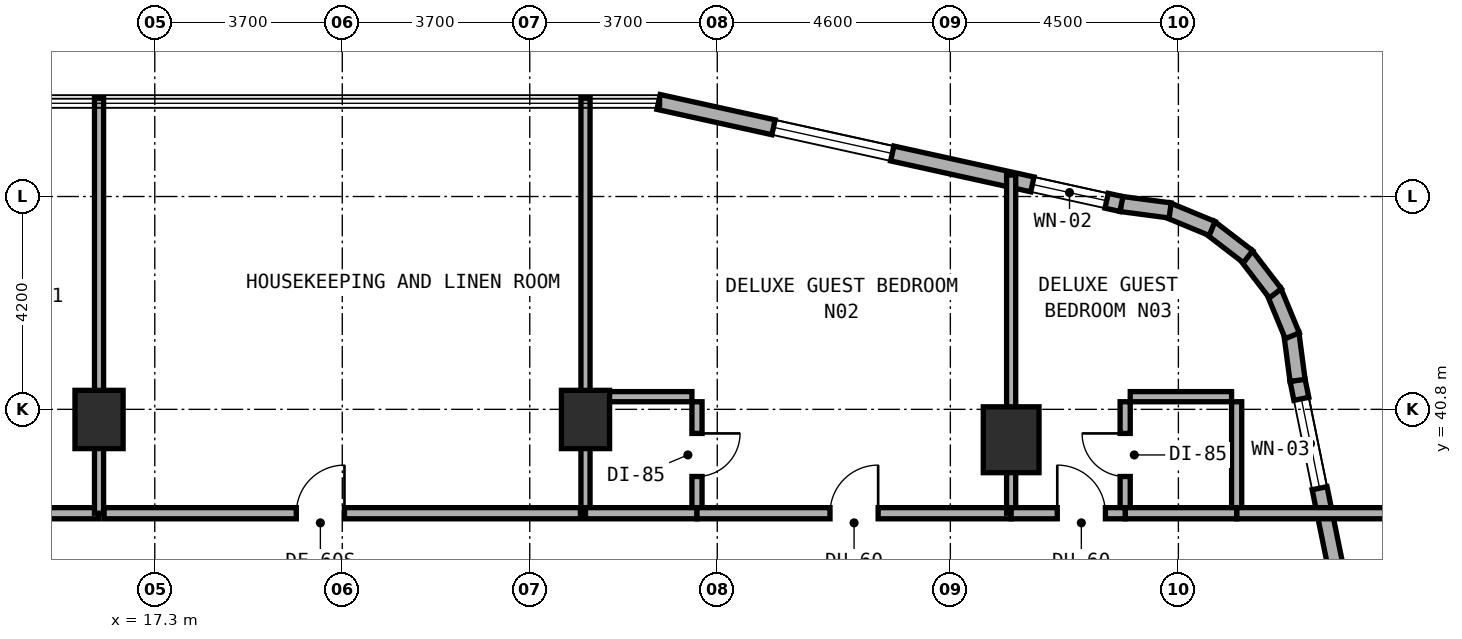
"""IFC4 building model, lengths in metres.
Left out: names, types, materials, properties, quantities, classifications, styles, units other than length and angle.
Written with IfcOpenShell. Run it as: python <this file> out.ifc"""

import sys

from ifc_helpers import new_model, si_unit, direction, frame, frame_2d, origin, origin_2d, place, context, subcontext, project, spatial, rectangle, extrude, element, fill, save


model = new_model("IFC4")
c1 = context("Model", 3, precision=1e-05, world=origin(), true_north=direction((0.0, 1.0)))
c2 = subcontext(c1, "Body", "Model", "MODEL_VIEW")
j1 = project(units=[si_unit("LENGTHUNIT", "METRE"), si_unit("PLANEANGLEUNIT", "RADIAN")], contexts=[c1])
p1 = place(None, origin())
s1 = spatial("IfcSite", under=j1, at=p1, CompositionType="ELEMENT")
p2 = place(p1, origin())
s2 = spatial("IfcBuilding", under=s1, at=p2, CompositionType="ELEMENT")
p3 = place(p2, frame((0.0, 0.0, 31.0)))
s3 = spatial("IfcBuildingStorey", under=s2, at=p3, CompositionType="ELEMENT", Elevation=31.0)
for number, where, z_axis, x_axis in (
    (1, (16.2, 40.6, 0.0), (0.0, 0.0, 1.0), (1.0, 0.0, 0.0)),
    (2, (25.8, 40.6, 0.0), (0.0, 0.0, 1.0), (1.0, 0.0, 0.0)),
):
    element("IfcColumn", number, at=place(p3, frame(where, z_axis=z_axis, x_axis=x_axis)), inside=s3, PredefinedType="COLUMN", context=c2, shape_type="SweptSolid", body=[
        extrude(rectangle(XDim=0.95, YDim=1.15, at=origin_2d()), origin(), (0.0, 0.0, 1.0), 3.5),
    ])
p4 = place(p3, frame((34.2, 40.2, 0.0), z_axis=(0.0, 0.0, 1.0), x_axis=(1.0, 0.0, 0.0)))
e3 = element("IfcColumn", 3, at=p4, inside=s3, PredefinedType="COLUMN", context=c2, shape_type="SweptSolid", body=[
    extrude(rectangle(XDim=1.1, YDim=1.3, at=origin_2d()), origin(), (0.0, 0.0, 1.0), 3.5),
])
p5 = place(p3, frame((41.864, 31.516, 0.0), z_axis=(0.0, 0.0, 1.0), x_axis=(-0.199990901713, 0.979797754249, 0.0)))
e4 = element("IfcWall", 4, at=p5, inside=s3, PredefinedType="STANDARD", context=c2, shape_type="SweptSolid", body=[
    extrude(rectangle(XDim=10.065, YDim=0.3, at=frame_2d((5.033, 0.0))), origin(), (0.0, 0.0, 1.0), 3.22),
])
p6 = place(p5, frame((2.429, 0.0, 0.8)))
e5 = element("IfcOpeningElement", 5, at=p6, cuts=e4, PredefinedType="OPENING", context=c2, shape_type="SweptSolid", body=[
    extrude(rectangle(XDim=2.4, YDim=1.6, at=frame_2d((1.2, 0.8))), frame((0.0, 0.16, 0.0), z_axis=(0.0, -1.0, 0.0), x_axis=(1.0, 0.0, 0.0)), (0.0, 0.0, 1.0), 0.32),
])
p7 = place(p5, frame((7.887, 0.0, 0.85)))
e6 = element("IfcOpeningElement", 6, at=p7, cuts=e4, PredefinedType="OPENING", context=c2, shape_type="SweptSolid", body=[
    extrude(rectangle(XDim=1.8, YDim=1.5, at=frame_2d((0.9, 0.75))), frame((0.0, 0.16, 0.0), z_axis=(0.0, -1.0, 0.0), x_axis=(1.0, 0.0, 0.0)), (0.0, 0.0, 1.0), 0.32),
])
p8 = place(p3, frame((39.852, 41.372, 0.0), z_axis=(0.0, 0.0, 1.0), x_axis=(-0.131174864804, 0.991359246108, 0.0)))
e7 = element("IfcWall", 7, at=p8, inside=s3, PredefinedType="STANDARD", context=c2, shape_type="SweptSolid", body=[
    extrude(rectangle(XDim=0.938, YDim=0.3, at=frame_2d((0.469, 0.0))), origin(), (0.0, 0.0, 1.0), 3.22),
])
p9 = place(p3, frame((39.748, 42.252, 0.0), z_axis=(0.0, 0.0, 1.0), x_axis=(-0.382344263057, 0.924019948111, 0.0)))
e8 = element("IfcWall", 8, at=p9, inside=s3, PredefinedType="STANDARD", context=c2, shape_type="SweptSolid", body=[
    extrude(rectangle(XDim=0.955, YDim=0.3, at=frame_2d((0.477, 0.0))), origin(), (0.0, 0.0, 1.0), 3.22),
])
p10 = place(p3, frame((39.414, 43.089, 0.0), z_axis=(0.0, 0.0, 1.0), x_axis=(-0.608474481025, 0.793573440799, 0.0)))
e9 = element("IfcWall", 9, at=p10, inside=s3, PredefinedType="STANDARD", context=c2, shape_type="SweptSolid", body=[
    extrude(rectangle(XDim=0.955, YDim=0.3, at=frame_2d((0.478, 0.0))), origin(), (0.0, 0.0, 1.0), 3.22),
])
p11 = place(p3, frame((38.875, 43.812, 0.0), z_axis=(0.0, 0.0, 1.0), x_axis=(-0.793668068435, 0.608351047625, 0.0)))
e10 = element("IfcWall", 10, at=p11, inside=s3, PredefinedType="STANDARD", context=c2, shape_type="SweptSolid", body=[
    extrude(rectangle(XDim=0.955, YDim=0.3, at=frame_2d((0.478, 0.0))), origin(), (0.0, 0.0, 1.0), 3.22),
])
p12 = place(p3, frame((38.166, 44.369, 0.0), z_axis=(0.0, 0.0, 1.0), x_axis=(-0.924019948111, 0.382344263057, 0.0)))
e11 = element("IfcWall", 11, at=p12, inside=s3, PredefinedType="STANDARD", context=c2, shape_type="SweptSolid", body=[
    extrude(rectangle(XDim=0.955, YDim=0.3, at=frame_2d((0.477, 0.0))), origin(), (0.0, 0.0, 1.0), 3.22),
])
p13 = place(p3, frame((37.337, 44.725, 0.0), z_axis=(0.0, 0.0, 1.0), x_axis=(-0.991454295543, 0.130454512571, 0.0)))
e12 = element("IfcWall", 12, at=p13, inside=s3, PredefinedType="STANDARD", context=c2, shape_type="SweptSolid", body=[
    extrude(rectangle(XDim=0.973, YDim=0.3, at=frame_2d((0.487, 0.0))), origin(), (0.0, 0.0, 1.0), 3.22),
])
p14 = place(p3, frame((36.376, 44.852, 0.0), z_axis=(0.0, 0.0, 1.0), x_axis=(-0.97654500432, 0.215313386808, 0.0)))
e13 = element("IfcWall", 13, at=p14, inside=s3, PredefinedType="STANDARD", context=c2, shape_type="SweptSolid", body=[
    extrude(rectangle(XDim=9.354, YDim=0.3, at=frame_2d((4.677, 0.0))), origin(), (0.0, 0.0, 1.0), 3.22),
])
p15 = place(p14, frame((0.299, 0.0, 0.85)))
e14 = element("IfcOpeningElement", 14, at=p15, cuts=e13, PredefinedType="OPENING", context=c2, shape_type="SweptSolid", body=[
    extrude(rectangle(XDim=1.5, YDim=1.5, at=frame_2d((0.75, 0.75))), frame((0.0, 0.16, 0.0), z_axis=(0.0, -1.0, 0.0), x_axis=(1.0, 0.0, 0.0)), (0.0, 0.0, 1.0), 0.32),
])
p16 = place(p14, frame((4.631, 0.0, 0.8)))
e15 = element("IfcOpeningElement", 15, at=p16, cuts=e13, PredefinedType="OPENING", context=c2, shape_type="SweptSolid", body=[
    extrude(rectangle(XDim=2.4, YDim=1.6, at=frame_2d((1.2, 0.8))), frame((0.0, 0.16, 0.0), z_axis=(0.0, -1.0, 0.0), x_axis=(1.0, 0.0, 0.0)), (0.0, 0.0, 1.0), 0.32),
])
p17 = place(p3, frame((5.55, 38.75, 0.0), z_axis=(0.0, 0.0, 1.0), x_axis=(1.0, 0.0, 0.0)))
e16 = element("IfcWall", 16, at=p17, inside=s3, PredefinedType="SOLIDWALL", context=c2, shape_type="SweptSolid", body=[
    extrude(rectangle(XDim=10.65, YDim=0.22, at=frame_2d((5.325, 0.0))), origin(), (0.0, 0.0, 1.0), 2.395),
])
p18 = place(p17, frame((4.85, 0.0, 0.0)))
e17 = element("IfcOpeningElement", 17, at=p18, cuts=e16, PredefinedType="OPENING", context=c2, shape_type="SweptSolid", body=[
    extrude(rectangle(XDim=0.95, YDim=2.1, at=frame_2d((0.475, 1.05))), frame((0.0, 0.12, 0.0), z_axis=(0.0, -1.0, 0.0), x_axis=(1.0, 0.0, 0.0)), (0.0, 0.0, 1.0), 0.24),
])
p19 = place(p3, frame((16.2, 38.75, 0.0), z_axis=(0.0, 0.0, 1.0), x_axis=(0.0, 1.0, 0.0)))
e18 = element("IfcWall", 18, at=p19, inside=s3, PredefinedType="SOLIDWALL", context=c2, shape_type="SweptSolid", body=[
    extrude(rectangle(XDim=8.19, YDim=0.18, at=frame_2d((4.095, 0.0))), origin(), (0.0, 0.0, 1.0), 2.395),
])
p20 = place(p3, frame((16.3, 38.75, 0.0), z_axis=(0.0, 0.0, 1.0), x_axis=(1.0, 0.0, 0.0)))
e19 = element("IfcWall", 19, at=p20, inside=s3, PredefinedType="SOLIDWALL", context=c2, shape_type="SweptSolid", body=[
    extrude(rectangle(XDim=9.4, YDim=0.22, at=frame_2d((4.7, 0.0))), origin(), (0.0, 0.0, 1.0), 2.795),
])
p21 = place(p20, frame((3.793, 0.0, 0.0)))
e20 = element("IfcOpeningElement", 20, at=p21, cuts=e19, PredefinedType="OPENING", context=c2, shape_type="SweptSolid", body=[
    extrude(rectangle(XDim=0.95, YDim=2.1, at=frame_2d((0.475, 1.05))), frame((0.0, 0.12, 0.0), z_axis=(0.0, -1.0, 0.0), x_axis=(1.0, 0.0, 0.0)), (0.0, 0.0, 1.0), 0.24),
])
p22 = place(p3, frame((25.8, 38.75, 0.0), z_axis=(0.0, 0.0, 1.0), x_axis=(0.0, 1.0, 0.0)))
e21 = element("IfcWall", 21, at=p22, inside=s3, PredefinedType="SOLIDWALL", context=c2, shape_type="SweptSolid", body=[
    extrude(rectangle(XDim=8.19, YDim=0.18, at=frame_2d((4.095, 0.0))), origin(), (0.0, 0.0, 1.0), 2.395),
])
p23 = place(p3, frame((28.0, 38.85, 0.0), z_axis=(0.0, 0.0, 1.0), x_axis=(0.0, 1.0, 0.0)))
e22 = element("IfcWall", 22, at=p23, inside=s3, PredefinedType="PLUMBINGWALL", context=c2, shape_type="SweptSolid", body=[
    extrude(rectangle(XDim=2.1, YDim=0.2, at=frame_2d((1.05, 0.0))), origin(), (0.0, 0.0, 1.0), 2.745),
])
p24 = place(p23, frame((0.625, 0.0, 0.0)))
e23 = element("IfcOpeningElement", 23, at=p24, cuts=e22, PredefinedType="OPENING", context=c2, shape_type="SweptSolid", body=[
    extrude(rectangle(XDim=0.85, YDim=2.1, at=frame_2d((0.425, 1.05))), frame((0.0, 0.11, 0.0), z_axis=(0.0, -1.0, 0.0), x_axis=(1.0, 0.0, 0.0)), (0.0, 0.0, 1.0), 0.22),
])
p25 = place(p3, frame((25.9, 41.05, 0.0), z_axis=(0.0, 0.0, 1.0), x_axis=(1.0, 0.0, 0.0)))
e24 = element("IfcWall", 24, at=p25, inside=s3, PredefinedType="PLUMBINGWALL", context=c2, shape_type="SweptSolid", body=[
    extrude(rectangle(XDim=2.0, YDim=0.2, at=frame_2d((1.0, 0.0))), origin(), (0.0, 0.0, 1.0), 3.22),
])
p26 = place(p3, frame((25.8, 38.75, 0.0), z_axis=(0.0, 0.0, 1.0), x_axis=(1.0, 0.0, 0.0)))
e25 = element("IfcWall", 25, at=p26, inside=s3, PredefinedType="SOLIDWALL", context=c2, shape_type="SweptSolid", body=[
    extrude(rectangle(XDim=2.2, YDim=0.22, at=frame_2d((1.1, 0.0))), origin(), (0.0, 0.0, 1.0), 2.395),
])
p27 = place(p3, frame((28.0, 38.75, 0.0), z_axis=(0.0, 0.0, 1.0), x_axis=(1.0, 0.0, 0.0)))
e26 = element("IfcWall", 26, at=p27, inside=s3, PredefinedType="SOLIDWALL", context=c2, shape_type="SweptSolid", body=[
    extrude(rectangle(XDim=6.2, YDim=0.22, at=frame_2d((3.1, 0.0))), origin(), (0.0, 0.0, 1.0), 2.395),
])
p28 = place(p27, frame((2.625, 0.0, 0.0)))
e27 = element("IfcOpeningElement", 27, at=p28, cuts=e26, PredefinedType="OPENING", context=c2, shape_type="SweptSolid", body=[
    extrude(rectangle(XDim=0.95, YDim=2.1, at=frame_2d((0.475, 1.05))), frame((0.0, 0.12, 0.0), z_axis=(0.0, -1.0, 0.0), x_axis=(1.0, 0.0, 0.0)), (0.0, 0.0, 1.0), 0.24),
])
p29 = place(p3, frame((34.2, 38.75, 0.0), z_axis=(0.0, 0.0, 1.0), x_axis=(0.0, 1.0, 0.0)))
e28 = element("IfcWall", 28, at=p29, inside=s3, PredefinedType="SOLIDWALL", context=c2, shape_type="SweptSolid", body=[
    extrude(rectangle(XDim=6.674, YDim=0.18, at=frame_2d((3.337, 0.0))), origin(), (0.0, 0.0, 1.0), 2.395),
])
p30 = place(p3, frame((36.45, 38.85, 0.0), z_axis=(0.0, 0.0, 1.0), x_axis=(0.0, 1.0, 0.0)))
e29 = element("IfcWall", 29, at=p30, inside=s3, PredefinedType="PLUMBINGWALL", context=c2, shape_type="SweptSolid", body=[
    extrude(rectangle(XDim=2.1, YDim=0.2, at=frame_2d((1.05, 0.0))), origin(), (0.0, 0.0, 1.0), 3.22),
])
p31 = place(p30, frame((0.625, 0.0, 0.0)))
e30 = element("IfcOpeningElement", 30, at=p31, cuts=e29, PredefinedType="OPENING", context=c2, shape_type="SweptSolid", body=[
    extrude(rectangle(XDim=0.85, YDim=2.1, at=frame_2d((0.425, 1.05))), frame((0.0, 0.11, 0.0), z_axis=(0.0, -1.0, 0.0), x_axis=(1.0, 0.0, 0.0)), (0.0, 0.0, 1.0), 0.22),
])
p32 = place(p3, frame((36.55, 41.05, 0.0), z_axis=(0.0, 0.0, 1.0), x_axis=(1.0, 0.0, 0.0)))
e31 = element("IfcWall", 31, at=p32, inside=s3, PredefinedType="PLUMBINGWALL", context=c2, shape_type="SweptSolid", body=[
    extrude(rectangle(XDim=2.0, YDim=0.2, at=frame_2d((1.0, 0.0))), origin(), (0.0, 0.0, 1.0), 3.22),
])
p33 = place(p3, frame((38.65, 38.85, 0.0), z_axis=(0.0, 0.0, 1.0), x_axis=(0.0, 1.0, 0.0)))
e32 = element("IfcWall", 32, at=p33, inside=s3, PredefinedType="PLUMBINGWALL", context=c2, shape_type="SweptSolid", body=[
    extrude(rectangle(XDim=2.1, YDim=0.2, at=frame_2d((1.05, 0.0))), origin(), (0.0, 0.0, 1.0), 3.22),
])
p34 = place(p3, frame((38.65, 38.75, 0.0), z_axis=(0.0, 0.0, 1.0), x_axis=(1.0, 0.0, 0.0)))
e33 = element("IfcWall", 33, at=p34, inside=s3, PredefinedType="SOLIDWALL", context=c2, shape_type="SweptSolid", body=[
    extrude(rectangle(XDim=3.19, YDim=0.22, at=frame_2d((1.595, 0.0))), origin(), (0.0, 0.0, 1.0), 3.22),
])
p35 = place(p3, frame((36.45, 38.75, 0.0), z_axis=(0.0, 0.0, 1.0), x_axis=(1.0, 0.0, 0.0)))
e34 = element("IfcWall", 34, at=p35, inside=s3, PredefinedType="SOLIDWALL", context=c2, shape_type="SweptSolid", body=[
    extrude(rectangle(XDim=2.2, YDim=0.22, at=frame_2d((1.1, 0.0))), origin(), (0.0, 0.0, 1.0), 3.22),
])
p36 = place(p3, frame((34.2, 38.75, 0.0), z_axis=(0.0, 0.0, 1.0), x_axis=(1.0, 0.0, 0.0)))
e35 = element("IfcWall", 35, at=p36, inside=s3, PredefinedType="SOLIDWALL", context=c2, shape_type="SweptSolid", body=[
    extrude(rectangle(XDim=2.25, YDim=0.22, at=frame_2d((1.125, 0.0))), origin(), (0.0, 0.0, 1.0), 2.395),
])
p37 = place(p36, frame((0.91, 0.0, 0.0)))
e36 = element("IfcOpeningElement", 36, at=p37, cuts=e35, PredefinedType="OPENING", context=c2, shape_type="SweptSolid", body=[
    extrude(rectangle(XDim=0.95, YDim=2.1, at=frame_2d((0.475, 1.05))), frame((0.0, 0.12, 0.0), z_axis=(0.0, -1.0, 0.0), x_axis=(1.0, 0.0, 0.0)), (0.0, 0.0, 1.0), 0.24),
])
p38 = place(p7, origin())
e37 = element("IfcWindow", 37, at=p38, inside=s3, PartitioningType="SINGLE_PANEL", PredefinedType="WINDOW", context=c2, shape_type="SweptSolid", body=[
    extrude(rectangle(XDim=1.8, YDim=1.5, at=frame_2d((0.9, 0.75))), frame((0.0, 0.03, 0.0), z_axis=(0.0, -1.0, 0.0), x_axis=(1.0, 0.0, 0.0)), (0.0, 0.0, 1.0), 0.06),
])
fill(e6, e37)
p39 = place(p15, origin())
e38 = element("IfcWindow", 38, at=p39, inside=s3, PartitioningType="SINGLE_PANEL", PredefinedType="WINDOW", context=c2, shape_type="SweptSolid", body=[
    extrude(rectangle(XDim=1.5, YDim=1.5, at=frame_2d((0.75, 0.75))), frame((0.0, 0.03, 0.0), z_axis=(0.0, -1.0, 0.0), x_axis=(1.0, 0.0, 0.0)), (0.0, 0.0, 1.0), 0.06),
])
fill(e14, e38)
p40 = place(p16, origin())
e39 = element("IfcWindow", 39, at=p40, inside=s3, PartitioningType="SINGLE_PANEL", PredefinedType="WINDOW", context=c2, shape_type="SweptSolid", body=[
    extrude(rectangle(XDim=2.4, YDim=1.6, at=frame_2d((1.2, 0.8))), frame((0.0, 0.03, 0.0), z_axis=(0.0, -1.0, 0.0), x_axis=(1.0, 0.0, 0.0)), (0.0, 0.0, 1.0), 0.06),
])
fill(e15, e39)
p41 = place(p21, origin())
e40 = element("IfcDoor", 40, at=p41, inside=s3, OperationType="SINGLE_SWING_RIGHT", PredefinedType="DOOR", context=c2, shape_type="SweptSolid", body=[
    extrude(rectangle(XDim=0.95, YDim=2.1, at=frame_2d((0.475, 1.05))), frame((0.0, 0.025, 0.0), z_axis=(0.0, -1.0, 0.0), x_axis=(1.0, 0.0, 0.0)), (0.0, 0.0, 1.0), 0.05),
])
fill(e20, e40)
p42 = place(p24, frame((0.85, 0.0, 0.0), z_axis=(0.0, 0.0, 1.0), x_axis=(-1.0, 0.0, 0.0)))
e41 = element("IfcDoor", 41, at=p42, inside=s3, OperationType="SINGLE_SWING_LEFT", PredefinedType="DOOR", context=c2, shape_type="SweptSolid", body=[
    extrude(rectangle(XDim=0.85, YDim=2.1, at=frame_2d((0.425, 1.05))), frame((0.0, 0.025, 0.0), z_axis=(0.0, -1.0, 0.0), x_axis=(1.0, 0.0, 0.0)), (0.0, 0.0, 1.0), 0.05),
])
fill(e23, e41)
p43 = place(p28, origin())
e42 = element("IfcDoor", 42, at=p43, inside=s3, OperationType="SINGLE_SWING_RIGHT", PredefinedType="DOOR", context=c2, shape_type="SweptSolid", body=[
    extrude(rectangle(XDim=0.95, YDim=2.1, at=frame_2d((0.475, 1.05))), frame((0.0, 0.025, 0.0), z_axis=(0.0, -1.0, 0.0), x_axis=(1.0, 0.0, 0.0)), (0.0, 0.0, 1.0), 0.05),
])
fill(e27, e42)
p44 = place(p31, origin())
e43 = element("IfcDoor", 43, at=p44, inside=s3, OperationType="SINGLE_SWING_RIGHT", PredefinedType="DOOR", context=c2, shape_type="SweptSolid", body=[
    extrude(rectangle(XDim=0.85, YDim=2.1, at=frame_2d((0.425, 1.05))), frame((0.0, 0.025, 0.0), z_axis=(0.0, -1.0, 0.0), x_axis=(1.0, 0.0, 0.0)), (0.0, 0.0, 1.0), 0.05),
])
fill(e30, e43)
p45 = place(p37, origin())
e44 = element("IfcDoor", 44, at=p45, inside=s3, OperationType="SINGLE_SWING_LEFT", PredefinedType="DOOR", context=c2, shape_type="SweptSolid", body=[
    extrude(rectangle(XDim=0.95, YDim=2.1, at=frame_2d((0.475, 1.05))), frame((0.0, 0.025, 0.0), z_axis=(0.0, -1.0, 0.0), x_axis=(1.0, 0.0, 0.0)), (0.0, 0.0, 1.0), 0.05),
])
fill(e36, e44)
save(model, sys.argv[1])
